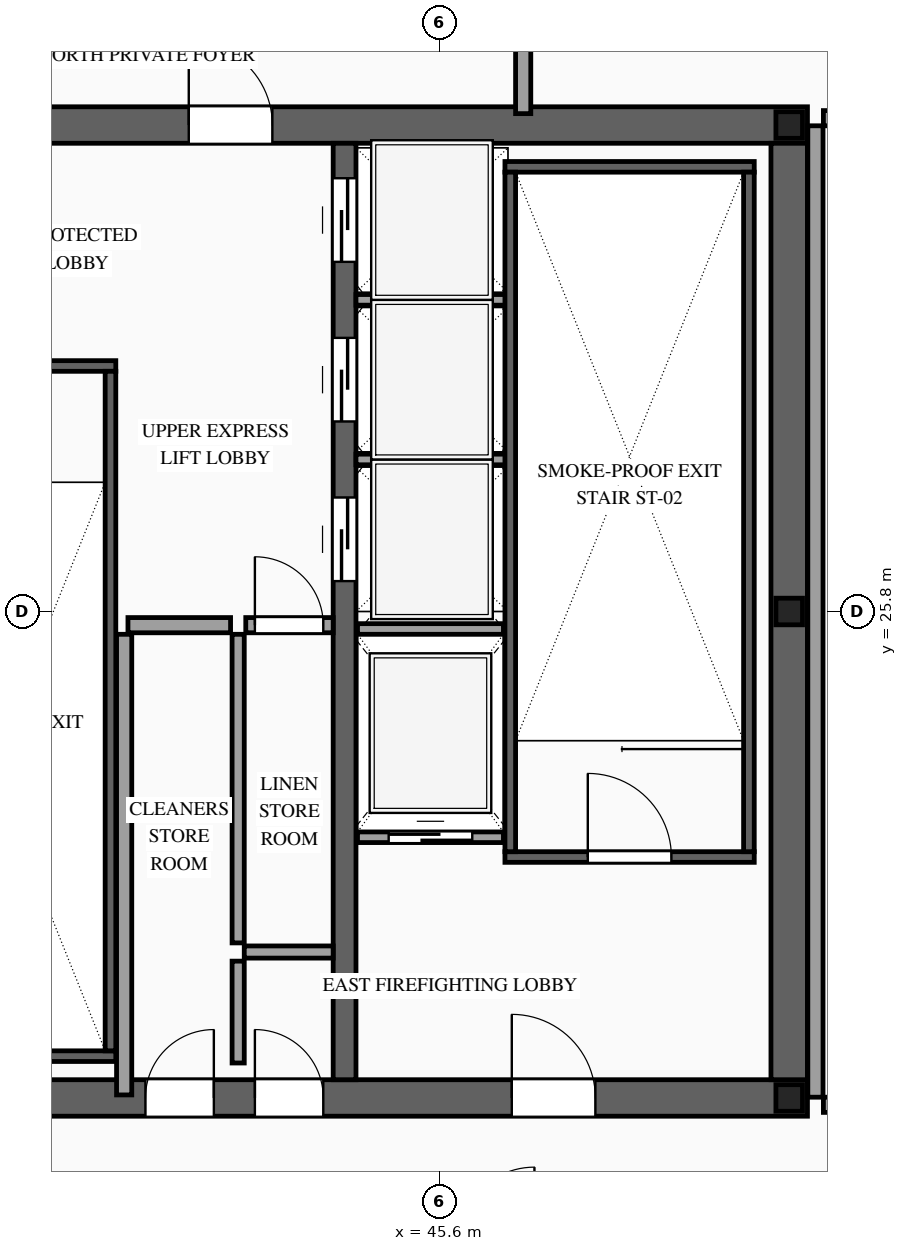
"""IFC4 building model, lengths in metres.
Left out: names, types, materials, properties, quantities, classifications, styles, units other than length and angle.
Written with IfcOpenShell. Run it as: python <this file> out.ifc"""

import sys

from ifc_helpers import new_model, si_unit, direction, frame, frame_2d, origin, origin_2d, place, context, subcontext, project, spatial, rectangle, i_section, extrude, source, transform, mapped, element, fill, save


model = new_model("IFC4")
c1 = context("Model", 3, precision=1e-05, world=origin(), true_north=direction((0.0, 1.0)))
c2 = subcontext(c1, "Body", "Model", "MODEL_VIEW")
j1 = project(units=[si_unit("LENGTHUNIT", "METRE"), si_unit("PLANEANGLEUNIT", "RADIAN")], contexts=[c1])
p1 = place(None, origin())
s1 = spatial("IfcSite", under=j1, at=p1, CompositionType="ELEMENT")
p2 = place(p1, origin())
s2 = spatial("IfcBuilding", under=s1, at=p2, CompositionType="ELEMENT")
p3 = place(p2, frame((0.0, 0.0, 347.2)))
s3 = spatial("IfcBuildingStorey", under=s2, at=p3, CompositionType="ELEMENT", Elevation=347.2)
p4 = place(p3, frame((23.56, 19.4, 0.0), z_axis=(0.0, 0.0, 1.0), x_axis=(1.0, 0.0, 0.0)))
e1 = element("IfcWall", 1, at=p4, inside=s3, PredefinedType="SHEAR", context=c2, shape_type="SweptSolid", body=[
    extrude(rectangle(XDim=26.88, YDim=0.48, at=frame_2d((13.44, 0.0))), origin(), (0.0, 0.0, 1.0), 4.0),
])
p5 = place(p4, frame((1.89, 0.0, 0.0)))
e2 = element("IfcOpeningElement", 2, at=p5, cuts=e1, PredefinedType="OPENING", context=c2, shape_type="SweptSolid", body=[
    extrude(rectangle(XDim=1.1, YDim=2.2, at=frame_2d((0.55, 1.1))), frame((0.0, 0.255, 0.0), z_axis=(0.0, -1.0, 0.0), x_axis=(1.0, 0.0, 0.0)), (0.0, 0.0, 1.0), 0.51),
])
p6 = place(p4, frame((9.79, 0.0, 0.0)))
e3 = element("IfcOpeningElement", 3, at=p6, cuts=e1, PredefinedType="OPENING", context=c2, shape_type="SweptSolid", body=[
    extrude(rectangle(XDim=1.1, YDim=2.2, at=frame_2d((0.55, 1.1))), frame((0.0, 0.255, 0.0), z_axis=(0.0, -1.0, 0.0), x_axis=(1.0, 0.0, 0.0)), (0.0, 0.0, 1.0), 0.51),
])
p7 = place(p4, frame((22.99, 0.0, 0.0)))
e4 = element("IfcOpeningElement", 4, at=p7, cuts=e1, PredefinedType="OPENING", context=c2, shape_type="SweptSolid", body=[
    extrude(rectangle(XDim=1.1, YDim=2.2, at=frame_2d((0.55, 1.1))), frame((0.0, 0.255, 0.0), z_axis=(0.0, -1.0, 0.0), x_axis=(1.0, 0.0, 0.0)), (0.0, 0.0, 1.0), 0.51),
])
p8 = place(p4, frame((19.61, 0.0, 0.0)))
e5 = element("IfcOpeningElement", 5, at=p8, cuts=e1, PredefinedType="OPENING", context=c2, shape_type="SweptSolid", body=[
    extrude(rectangle(XDim=0.9, YDim=2.15, at=frame_2d((0.45, 1.075))), frame((0.0, 0.255, 0.0), z_axis=(0.0, -1.0, 0.0), x_axis=(1.0, 0.0, 0.0)), (0.0, 0.0, 1.0), 0.51),
])
p9 = place(p4, frame((18.17, 0.0, 0.0)))
e6 = element("IfcOpeningElement", 6, at=p9, cuts=e1, PredefinedType="OPENING", context=c2, shape_type="SweptSolid", body=[
    extrude(rectangle(XDim=0.9, YDim=2.15, at=frame_2d((0.45, 1.075))), frame((0.0, 0.255, 0.0), z_axis=(0.0, -1.0, 0.0), x_axis=(1.0, 0.0, 0.0)), (0.0, 0.0, 1.0), 0.51),
])
p10 = place(p3, frame((23.56, 32.2, 0.0), z_axis=(0.0, 0.0, 1.0), x_axis=(1.0, 0.0, 0.0)))
e7 = element("IfcWall", 7, at=p10, inside=s3, PredefinedType="SHEAR", context=c2, shape_type="SweptSolid", body=[
    extrude(rectangle(XDim=26.88, YDim=0.48, at=frame_2d((13.44, 0.0))), origin(), (0.0, 0.0, 1.0), 4.0),
])
p11 = place(p10, frame((4.51, 0.0, 0.0)))
e8 = element("IfcOpeningElement", 8, at=p11, cuts=e7, PredefinedType="OPENING", context=c2, shape_type="SweptSolid", body=[
    extrude(rectangle(XDim=0.9, YDim=2.15, at=frame_2d((0.45, 1.075))), frame((0.0, 0.255, 0.0), z_axis=(0.0, -1.0, 0.0), x_axis=(1.0, 0.0, 0.0)), (0.0, 0.0, 1.0), 0.51),
])
p12 = place(p10, frame((9.79, 0.0, 0.0)))
e9 = element("IfcOpeningElement", 9, at=p12, cuts=e7, PredefinedType="OPENING", context=c2, shape_type="SweptSolid", body=[
    extrude(rectangle(XDim=1.1, YDim=2.2, at=frame_2d((0.55, 1.1))), frame((0.0, 0.255, 0.0), z_axis=(0.0, -1.0, 0.0), x_axis=(1.0, 0.0, 0.0)), (0.0, 0.0, 1.0), 0.51),
])
p13 = place(p10, frame((15.64, 0.0, 0.0)))
e10 = element("IfcOpeningElement", 10, at=p13, cuts=e7, PredefinedType="OPENING", context=c2, shape_type="SweptSolid", body=[
    extrude(rectangle(XDim=1.1, YDim=2.2, at=frame_2d((0.55, 1.1))), frame((0.0, 0.255, 0.0), z_axis=(0.0, -1.0, 0.0), x_axis=(1.0, 0.0, 0.0)), (0.0, 0.0, 1.0), 0.51),
])
p14 = place(p10, frame((18.74, 0.0, 0.0)))
e11 = element("IfcOpeningElement", 11, at=p14, cuts=e7, PredefinedType="OPENING", context=c2, shape_type="SweptSolid", body=[
    extrude(rectangle(XDim=1.1, YDim=2.2, at=frame_2d((0.55, 1.1))), frame((0.0, 0.255, 0.0), z_axis=(0.0, -1.0, 0.0), x_axis=(1.0, 0.0, 0.0)), (0.0, 0.0, 1.0), 0.51),
])
m1 = source(origin(), c2, "Body", "SweptSolid", [
    extrude(rectangle(XDim=12.32, YDim=0.48, at=frame_2d((6.16, 0.0))), origin(), (0.0, 0.0, 1.0), 4.0),
])
p15 = place(p3, frame((50.2, 19.64, 0.0), z_axis=(0.0, 0.0, 1.0), x_axis=(0.0, 1.0, 0.0)))
e12 = element("IfcWall", 12, at=p15, inside=s3, PredefinedType="SHEAR", context=c2, shape_type="MappedRepresentation", body=[
    mapped(m1, transform((0.0, 0.0, 0.0), scale=1.0)),
])
p16 = place(p3, frame((44.35, 19.64, 0.0), z_axis=(0.0, 0.0, 1.0), x_axis=(0.0, 1.0, 0.0)))
e13 = element("IfcWall", 13, at=p16, inside=s3, PredefinedType="SOLIDWALL", context=c2, shape_type="SweptSolid", body=[
    extrude(rectangle(XDim=12.32, YDim=0.3, at=frame_2d((6.16, 0.0))), origin(), (0.0, 0.0, 1.0), 4.0),
])
p17 = place(p16, frame((6.56, 0.0, 0.0)))
e14 = element("IfcOpeningElement", 14, at=p17, cuts=e13, PredefinedType="OPENING", context=c2, shape_type="SweptSolid", body=[
    extrude(rectangle(XDim=1.1, YDim=2.2, at=frame_2d((0.55, 1.1))), frame((0.0, 0.165, 0.0), z_axis=(0.0, -1.0, 0.0), x_axis=(1.0, 0.0, 0.0)), (0.0, 0.0, 1.0), 0.33),
])
p18 = place(p16, frame((8.66, 0.0, 0.0)))
e15 = element("IfcOpeningElement", 15, at=p18, cuts=e13, PredefinedType="OPENING", context=c2, shape_type="SweptSolid", body=[
    extrude(rectangle(XDim=1.1, YDim=2.2, at=frame_2d((0.55, 1.1))), frame((0.0, 0.165, 0.0), z_axis=(0.0, -1.0, 0.0), x_axis=(1.0, 0.0, 0.0)), (0.0, 0.0, 1.0), 0.33),
])
p19 = place(p16, frame((10.76, 0.0, 0.0)))
e16 = element("IfcOpeningElement", 16, at=p19, cuts=e13, PredefinedType="OPENING", context=c2, shape_type="SweptSolid", body=[
    extrude(rectangle(XDim=1.1, YDim=2.2, at=frame_2d((0.55, 1.1))), frame((0.0, 0.165, 0.0), z_axis=(0.0, -1.0, 0.0), x_axis=(1.0, 0.0, 0.0)), (0.0, 0.0, 1.0), 0.33),
])
m2 = source(origin(), c2, "Body", "SweptSolid", [
    extrude(i_section(OverallWidth=0.35, OverallDepth=0.35, WebThickness=0.012, FlangeThickness=0.019, at=origin_2d()), origin(), (0.0, 0.0, 1.0), 4.0),
])
for number, where, z_axis, x_axis in (
    (17, (50.2, 19.4, 0.0), (0.0, 0.0, 1.0), (1.0, 0.0, 0.0)),
    (18, (50.2, 25.8, 0.0), (0.0, 0.0, 1.0), (1.0, 0.0, 0.0)),
    (19, (50.2, 32.2, 0.0), (0.0, 0.0, 1.0), (1.0, 0.0, 0.0)),
):
    element("IfcColumn", number, at=place(p3, frame(where, z_axis=z_axis, x_axis=x_axis)), inside=s3, PredefinedType="COLUMN", context=c2, shape_type="MappedRepresentation", body=[
        mapped(m2, transform((0.0, 0.0, 0.0), scale=1.0)),
    ])
p20 = place(p3, frame((44.52, 22.83, 0.0), z_axis=(0.0, 0.0, 1.0), x_axis=(1.0, 0.0, 0.0)))
e20 = element("IfcWall", 20, at=p20, inside=s3, PredefinedType="SOLIDWALL", context=c2, shape_type="SweptSolid", body=[
    extrude(rectangle(XDim=1.92, YDim=0.14, at=frame_2d((0.96, 0.0))), origin(), (0.0, 0.0, 1.0), 3.7),
])
p21 = place(p20, frame((0.41, 0.0, 0.0)))
e21 = element("IfcOpeningElement", 21, at=p21, cuts=e20, PredefinedType="OPENING", context=c2, shape_type="SweptSolid", body=[
    extrude(rectangle(XDim=1.1, YDim=2.2, at=frame_2d((0.55, 1.1))), frame((0.0, 0.085, 0.0), z_axis=(0.0, -1.0, 0.0), x_axis=(1.0, 0.0, 0.0)), (0.0, 0.0, 1.0), 0.17),
])
m3 = source(origin(), c2, "Body", "SweptSolid", [
    extrude(rectangle(XDim=1.92, YDim=0.14, at=frame_2d((0.96, 0.0))), origin(), (0.0, 0.0, 1.0), 3.7),
])
p22 = place(p3, frame((44.52, 25.57, 0.0), z_axis=(0.0, 0.0, 1.0), x_axis=(1.0, 0.0, 0.0)))
e22 = element("IfcWall", 22, at=p22, inside=s3, PredefinedType="SOLIDWALL", context=c2, shape_type="MappedRepresentation", body=[
    mapped(m3, transform((0.0, 0.0, 0.0), scale=1.0)),
])
m4 = source(origin(), c2, "Body", "SweptSolid", [
    extrude(rectangle(XDim=2.0, YDim=0.14, at=frame_2d((1.0, 0.0))), origin(), (0.0, 0.0, 1.0), 3.7),
])
for number, where, z_axis, x_axis in (
    (23, (44.5, 27.8, 0.0), (0.0, 0.0, 1.0), (1.0, 0.0, 0.0)),
    (24, (44.5, 29.9, 0.0), (0.0, 0.0, 1.0), (1.0, 0.0, 0.0)),
):
    element("IfcWall", number, at=place(p3, frame(where, z_axis=z_axis, x_axis=x_axis)), inside=s3, PredefinedType="SOLIDWALL", context=c2, shape_type="MappedRepresentation", body=[
        mapped(m4, transform((0.0, 0.0, 0.0), scale=1.0)),
    ])
p23 = place(p3, frame((46.46, 22.57, 0.0), z_axis=(0.0, 0.0, 1.0), x_axis=(1.0, 0.0, 0.0)))
e25 = element("IfcWall", 25, at=p23, inside=s3, PredefinedType="SOLIDWALL", context=c2, shape_type="SweptSolid", body=[
    extrude(rectangle(XDim=3.28, YDim=0.14, at=frame_2d((1.64, 0.0))), origin(), (0.0, 0.0, 1.0), 3.7),
])
p24 = place(p23, frame((1.09, 0.0, 0.0)))
e26 = element("IfcOpeningElement", 26, at=p24, cuts=e25, PredefinedType="OPENING", context=c2, shape_type="SweptSolid", body=[
    extrude(rectangle(XDim=1.1, YDim=2.2, at=frame_2d((0.55, 1.1))), frame((0.0, 0.085, 0.0), z_axis=(0.0, -1.0, 0.0), x_axis=(1.0, 0.0, 0.0)), (0.0, 0.0, 1.0), 0.17),
])
m5 = source(origin(), c2, "Body", "SweptSolid", [
    extrude(rectangle(XDim=3.28, YDim=0.14, at=frame_2d((1.64, 0.0))), origin(), (0.0, 0.0, 1.0), 3.7),
])
p25 = place(p3, frame((46.46, 31.65, 0.0), z_axis=(0.0, 0.0, 1.0), x_axis=(1.0, 0.0, 0.0)))
e27 = element("IfcWall", 27, at=p25, inside=s3, PredefinedType="SOLIDWALL", context=c2, shape_type="MappedRepresentation", body=[
    mapped(m5, transform((0.0, 0.0, 0.0), scale=1.0)),
])
m6 = source(origin(), c2, "Body", "SweptSolid", [
    extrude(rectangle(XDim=8.94, YDim=0.14, at=frame_2d((4.47, 0.0))), origin(), (0.0, 0.0, 1.0), 3.7),
])
for number, where, z_axis, x_axis in (
    (28, (46.53, 22.64, 0.0), (0.0, 0.0, 1.0), (0.0, 1.0, 0.0)),
    (29, (49.67, 22.64, 0.0), (0.0, 0.0, 1.0), (0.0, 1.0, 0.0)),
):
    element("IfcWall", number, at=place(p3, frame(where, z_axis=z_axis, x_axis=x_axis)), inside=s3, PredefinedType="SOLIDWALL", context=c2, shape_type="MappedRepresentation", body=[
        mapped(m6, transform((0.0, 0.0, 0.0), scale=1.0)),
    ])
p26 = place(p3, frame((38.2, 29.03, 0.0), z_axis=(0.0, 0.0, 1.0), x_axis=(1.0, 0.0, 0.0)))
e30 = element("IfcWall", 30, at=p26, inside=s3, PredefinedType="SOLIDWALL", context=c2, shape_type="SweptSolid", body=[
    extrude(rectangle(XDim=3.14, YDim=0.14, at=frame_2d((1.57, 0.0))), origin(), (0.0, 0.0, 1.0), 3.7),
])
p27 = place(p26, frame((1.02, 0.0, 0.0)))
e31 = element("IfcOpeningElement", 31, at=p27, cuts=e30, PredefinedType="OPENING", context=c2, shape_type="SweptSolid", body=[
    extrude(rectangle(XDim=1.1, YDim=2.2, at=frame_2d((0.55, 1.1))), frame((0.0, 0.085, 0.0), z_axis=(0.0, -1.0, 0.0), x_axis=(1.0, 0.0, 0.0)), (0.0, 0.0, 1.0), 0.17),
])
m7 = source(origin(), c2, "Body", "SweptSolid", [
    extrude(rectangle(XDim=3.14, YDim=0.14, at=frame_2d((1.57, 0.0))), origin(), (0.0, 0.0, 1.0), 3.7),
])
p28 = place(p3, frame((38.2, 19.95, 0.0), z_axis=(0.0, 0.0, 1.0), x_axis=(1.0, 0.0, 0.0)))
e32 = element("IfcWall", 32, at=p28, inside=s3, PredefinedType="SOLIDWALL", context=c2, shape_type="MappedRepresentation", body=[
    mapped(m7, transform((0.0, 0.0, 0.0), scale=1.0)),
])
m8 = source(origin(), c2, "Body", "SweptSolid", [
    extrude(rectangle(XDim=8.94, YDim=0.14, at=frame_2d((4.47, 0.0))), origin(), (0.0, 0.0, 1.0), 3.7),
])
p29 = place(p3, frame((41.27, 20.02, 0.0), z_axis=(0.0, 0.0, 1.0), x_axis=(0.0, 1.0, 0.0)))
e33 = element("IfcWall", 33, at=p29, inside=s3, PredefinedType="SOLIDWALL", context=c2, shape_type="MappedRepresentation", body=[
    mapped(m8, transform((0.0, 0.0, 0.0), scale=1.0)),
])
m9 = source(origin(), c2, "Body", "SweptSolid", [
    extrude(rectangle(XDim=1.34, YDim=0.16, at=frame_2d((0.67, 0.0))), origin(), (0.0, 0.0, 1.0), 3.7),
])
p30 = place(p3, frame((42.95, 19.86, 0.0), z_axis=(0.0, 0.0, 1.0), x_axis=(0.0, 1.0, 0.0)))
e34 = element("IfcWall", 34, at=p30, inside=s3, PredefinedType="PARTITIONING", context=c2, shape_type="MappedRepresentation", body=[
    mapped(m9, transform((0.0, 0.0, 0.0), scale=1.0)),
])
m10 = source(origin(), c2, "Body", "SweptSolid", [
    extrude(rectangle(XDim=1.17, YDim=0.16, at=frame_2d((0.585, 0.0))), origin(), (0.0, 0.0, 1.0), 3.7),
])
p31 = place(p3, frame((43.03, 21.32, 0.0), z_axis=(0.0, 0.0, 1.0), x_axis=(1.0, 0.0, 0.0)))
e35 = element("IfcWall", 35, at=p31, inside=s3, PredefinedType="PARTITIONING", context=c2, shape_type="MappedRepresentation", body=[
    mapped(m10, transform((0.0, 0.0, 0.0), scale=1.0)),
])
m11 = source(origin(), c2, "Body", "SweptSolid", [
    extrude(rectangle(XDim=6.06, YDim=0.2, at=frame_2d((3.03, 0.0))), origin(), (0.0, 0.0, 1.0), 3.7),
])
p32 = place(p3, frame((41.45, 19.44, 0.0), z_axis=(0.0, 0.0, 1.0), x_axis=(0.0, 1.0, 0.0)))
e36 = element("IfcWall", 36, at=p32, inside=s3, PredefinedType="PARTITIONING", context=c2, shape_type="MappedRepresentation", body=[
    mapped(m11, transform((0.0, 0.0, 0.0), scale=1.0)),
])
m12 = source(origin(), c2, "Body", "SweptSolid", [
    extrude(rectangle(XDim=1.35, YDim=0.2, at=frame_2d((0.675, 0.0))), origin(), (0.0, 0.0, 1.0), 3.7),
])
p33 = place(p3, frame((41.5, 25.62, 0.0), z_axis=(0.0, 0.0, 1.0), x_axis=(1.0, 0.0, 0.0)))
e37 = element("IfcWall", 37, at=p33, inside=s3, PredefinedType="PARTITIONING", context=c2, shape_type="MappedRepresentation", body=[
    mapped(m12, transform((0.0, 0.0, 0.0), scale=1.0)),
])
m13 = source(origin(), c2, "Body", "SweptSolid", [
    extrude(rectangle(XDim=4.06, YDim=0.16, at=frame_2d((2.03, 0.0))), origin(), (0.0, 0.0, 1.0), 3.7),
])
p34 = place(p3, frame((42.95, 21.44, 0.0), z_axis=(0.0, 0.0, 1.0), x_axis=(0.0, 1.0, 0.0)))
e38 = element("IfcWall", 38, at=p34, inside=s3, PredefinedType="PARTITIONING", context=c2, shape_type="MappedRepresentation", body=[
    mapped(m13, transform((0.0, 0.0, 0.0), scale=1.0)),
])
p35 = place(p3, frame((43.05, 25.62, 0.0), z_axis=(0.0, 0.0, 1.0), x_axis=(1.0, 0.0, 0.0)))
e39 = element("IfcWall", 39, at=p35, inside=s3, PredefinedType="PARTITIONING", context=c2, shape_type="SweptSolid", body=[
    extrude(rectangle(XDim=1.15, YDim=0.2, at=frame_2d((0.575, 0.0))), origin(), (0.0, 0.0, 1.0), 3.7),
])
p36 = place(p35, frame((0.12, 0.0, 0.0)))
e40 = element("IfcOpeningElement", 40, at=p36, cuts=e39, PredefinedType="OPENING", context=c2, shape_type="SweptSolid", body=[
    extrude(rectangle(XDim=0.9, YDim=2.15, at=frame_2d((0.45, 1.075))), frame((0.0, 0.115, 0.0), z_axis=(0.0, -1.0, 0.0), x_axis=(1.0, 0.0, 0.0)), (0.0, 0.0, 1.0), 0.23),
])
m14 = source(origin(), c2, "Body", "SweptSolid", [
    extrude(rectangle(XDim=1.7, YDim=0.2, at=frame_2d((0.85, 0.0))), origin(), (0.0, 0.0, 1.0), 3.7),
])
p37 = place(p3, frame((46.7, 32.35, 0.0), z_axis=(0.0, 0.0, 1.0), x_axis=(0.0, 1.0, 0.0)))
e41 = element("IfcWall", 41, at=p37, inside=s3, PredefinedType="PARTITIONING", context=c2, shape_type="MappedRepresentation", body=[
    mapped(m14, transform((0.0, 0.0, 0.0), scale=1.0)),
])
p38 = place(p3, frame((50.65, 19.31, 0.0), z_axis=(0.0, 0.0, 1.0), x_axis=(1.0, 0.0, 0.0)))
e42 = element("IfcWall", 42, at=p38, inside=s3, PredefinedType="PARTITIONING", context=c2, shape_type="SweptSolid", body=[
    extrude(rectangle(XDim=5.3, YDim=0.2, at=frame_2d((2.65, 0.0))), origin(), (0.0, 0.0, 1.0), 3.245),
])
p39 = place(p38, frame((0.4, 0.0, 0.0)))
e43 = element("IfcOpeningElement", 43, at=p39, cuts=e42, PredefinedType="OPENING", context=c2, shape_type="SweptSolid", body=[
    extrude(rectangle(XDim=1.0, YDim=2.2, at=frame_2d((0.5, 1.1))), frame((0.0, 0.115, 0.0), z_axis=(0.0, -1.0, 0.0), x_axis=(1.0, 0.0, 0.0)), (0.0, 0.0, 1.0), 0.23),
])
m15 = source(origin(), c2, "Body", "SweptSolid", [
    extrude(rectangle(XDim=5.3, YDim=0.2, at=frame_2d((2.65, 0.0))), origin(), (0.0, 0.0, 1.0), 3.245),
])
p40 = place(p3, frame((50.65, 32.29, 0.0), z_axis=(0.0, 0.0, 1.0), x_axis=(1.0, 0.0, 0.0)))
e44 = element("IfcWall", 44, at=p40, inside=s3, PredefinedType="PARTITIONING", context=c2, shape_type="MappedRepresentation", body=[
    mapped(m15, transform((0.0, 0.0, 0.0), scale=1.0)),
])
m16 = source(origin(), c2, "Body", "SweptSolid", [
    extrude(rectangle(XDim=12.78, YDim=0.2, at=frame_2d((6.39, 0.0))), origin(), (0.0, 0.0, 1.0), 3.7),
])
p41 = place(p3, frame((50.545, 19.41, 0.0), z_axis=(0.0, 0.0, 1.0), x_axis=(0.0, 1.0, 0.0)))
e45 = element("IfcWall", 45, at=p41, inside=s3, PredefinedType="PARTITIONING", context=c2, shape_type="MappedRepresentation", body=[
    mapped(m16, transform((0.0, 0.0, 0.0), scale=1.0)),
])
m17 = source(origin(), c2, "Body", "SweptSolid", [
    extrude(rectangle(XDim=1.1, YDim=2.2, at=frame_2d((0.55, 1.1))), frame((0.0, 0.025, 0.0), z_axis=(0.0, -1.0, 0.0), x_axis=(1.0, 0.0, 0.0)), (0.0, 0.0, 1.0), 0.05),
])
p42 = place(p21, origin())
e46 = element("IfcDoor", 46, at=p42, inside=s3, OperationType="SLIDING_TO_RIGHT", PredefinedType="DOOR", context=c2, shape_type="MappedRepresentation", body=[
    mapped(m17, transform((0.0, 0.0, 0.0), scale=1.0)),
])
fill(e21, e46)
p43 = place(p17, origin())
e47 = element("IfcDoor", 47, at=p43, inside=s3, OperationType="SLIDING_TO_LEFT", PredefinedType="DOOR", context=c2, shape_type="MappedRepresentation", body=[
    mapped(m17, transform((0.0, 0.0, 0.0), scale=1.0)),
])
fill(e14, e47)
p44 = place(p18, origin())
e48 = element("IfcDoor", 48, at=p44, inside=s3, OperationType="SLIDING_TO_RIGHT", PredefinedType="DOOR", context=c2, shape_type="MappedRepresentation", body=[
    mapped(m17, transform((0.0, 0.0, 0.0), scale=1.0)),
])
fill(e15, e48)
p45 = place(p19, origin())
e49 = element("IfcDoor", 49, at=p45, inside=s3, OperationType="SLIDING_TO_LEFT", PredefinedType="DOOR", context=c2, shape_type="MappedRepresentation", body=[
    mapped(m17, transform((0.0, 0.0, 0.0), scale=1.0)),
])
fill(e16, e49)
m18 = source(origin(), c2, "Body", "SweptSolid", [
    extrude(rectangle(XDim=1.1, YDim=2.2, at=frame_2d((0.55, 1.1))), frame((0.0, 0.025, 0.0), z_axis=(0.0, -1.0, 0.0), x_axis=(1.0, 0.0, 0.0)), (0.0, 0.0, 1.0), 0.05),
])
p46 = place(p24, origin())
e50 = element("IfcDoor", 50, at=p46, inside=s3, OperationType="SINGLE_SWING_LEFT", PredefinedType="DOOR", context=c2, shape_type="MappedRepresentation", body=[
    mapped(m18, transform((0.0, 0.0, 0.0), scale=1.0)),
])
fill(e26, e50)
p47 = place(p7, origin())
e51 = element("IfcDoor", 51, at=p47, inside=s3, OperationType="SINGLE_SWING_LEFT", PredefinedType="DOOR", context=c2, shape_type="MappedRepresentation", body=[
    mapped(m18, transform((0.0, 0.0, 0.0), scale=1.0)),
])
fill(e4, e51)
p48 = place(p14, origin())
e52 = element("IfcDoor", 52, at=p48, inside=s3, OperationType="SINGLE_SWING_LEFT", PredefinedType="DOOR", context=c2, shape_type="MappedRepresentation", body=[
    mapped(m18, transform((0.0, 0.0, 0.0), scale=1.0)),
])
fill(e11, e52)
m19 = source(origin(), c2, "Body", "SweptSolid", [
    extrude(rectangle(XDim=0.9, YDim=2.15, at=frame_2d((0.45, 1.075))), frame((0.0, 0.025, 0.0), z_axis=(0.0, -1.0, 0.0), x_axis=(1.0, 0.0, 0.0)), (0.0, 0.0, 1.0), 0.05),
])
p49 = place(p8, origin())
e53 = element("IfcDoor", 53, at=p49, inside=s3, OperationType="SINGLE_SWING_LEFT", PredefinedType="DOOR", context=c2, shape_type="MappedRepresentation", body=[
    mapped(m19, transform((0.0, 0.0, 0.0), scale=1.0)),
])
fill(e5, e53)
p50 = place(p9, origin())
e54 = element("IfcDoor", 54, at=p50, inside=s3, OperationType="SINGLE_SWING_RIGHT", PredefinedType="DOOR", context=c2, shape_type="MappedRepresentation", body=[
    mapped(m19, transform((0.0, 0.0, 0.0), scale=1.0)),
])
fill(e6, e54)
p51 = place(p36, origin())
e55 = element("IfcDoor", 55, at=p51, inside=s3, OperationType="SINGLE_SWING_LEFT", PredefinedType="DOOR", context=c2, shape_type="MappedRepresentation", body=[
    mapped(m19, transform((0.0, 0.0, 0.0), scale=1.0)),
])
fill(e40, e55)
save(model, sys.argv[1])
